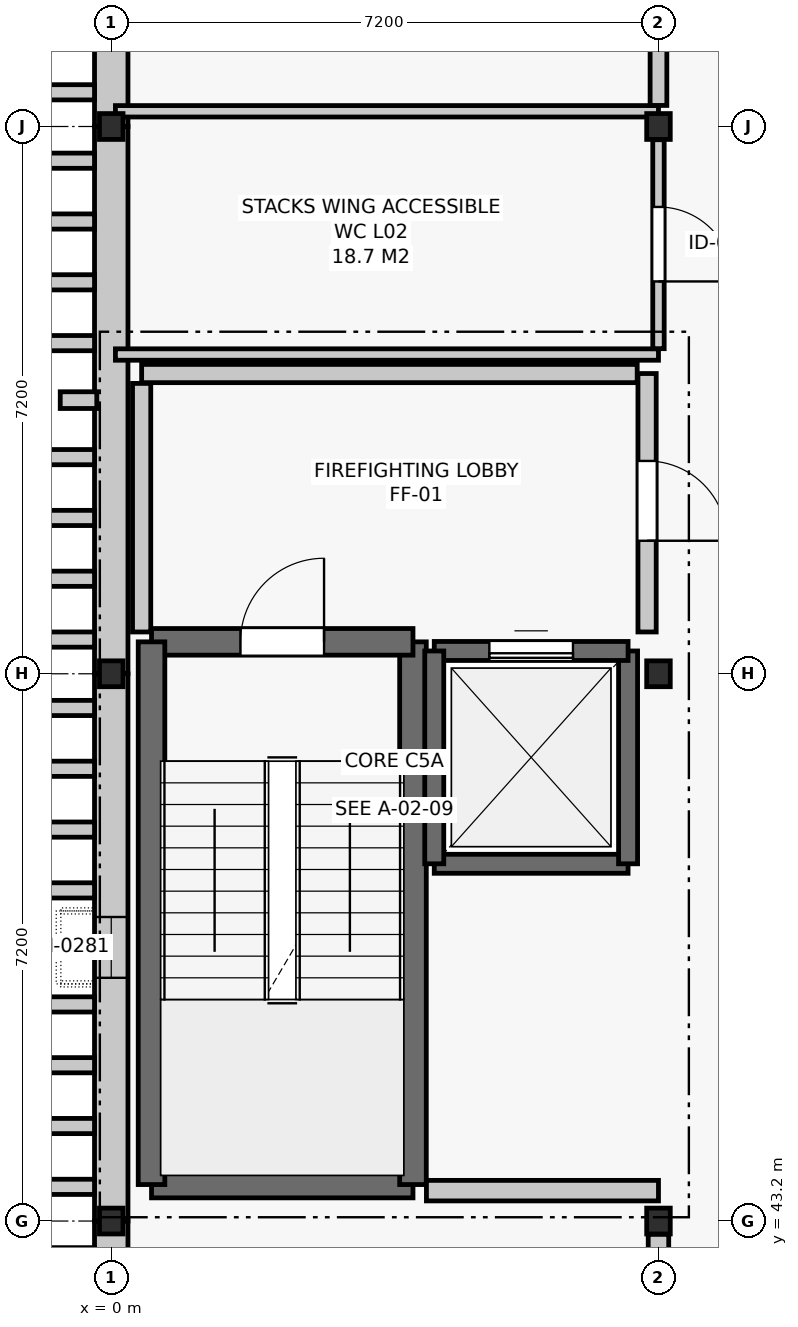
"""IFC4 building model, lengths in metres.
Left out: names, types, materials, properties, quantities, classifications, styles, units other than length and angle.
Written with IfcOpenShell. Run it as: python <this file> out.ifc"""

import sys

from ifc_helpers import new_model, si_unit, direction, frame, frame_2d, origin, origin_2d, place, context, subcontext, project, spatial, rectangle, i_section, extrude, element, fill, save


model = new_model("IFC4")
c1 = context("Model", 3, precision=1e-05, world=origin(), true_north=direction((0.0, 1.0)))
c2 = subcontext(c1, "Body", "Model", "MODEL_VIEW")
j1 = project(units=[si_unit("LENGTHUNIT", "METRE"), si_unit("PLANEANGLEUNIT", "RADIAN")], contexts=[c1])
p1 = place(None, origin())
s1 = spatial("IfcSite", under=j1, at=p1, CompositionType="ELEMENT")
p2 = place(p1, origin())
s2 = spatial("IfcBuilding", under=s1, at=p2, CompositionType="ELEMENT")
p3 = place(p2, frame((0.0, 0.0, 10.2)))
s3 = spatial("IfcBuildingStorey", under=s2, at=p3, CompositionType="ELEMENT", Elevation=10.2)
for number, where, z_axis, x_axis in (
    (1, (0.0, 43.2, 0.0), (0.0, 0.0, 1.0), (1.0, 0.0, 0.0)),
    (2, (0.0, 50.4, 0.0), (0.0, 0.0, 1.0), (1.0, 0.0, 0.0)),
    (3, (0.0, 57.6, 0.0), (0.0, 0.0, 1.0), (1.0, 0.0, 0.0)),
    (4, (7.2, 43.2, 0.0), (0.0, 0.0, 1.0), (1.0, 0.0, 0.0)),
    (5, (7.2, 50.4, 0.0), (0.0, 0.0, 1.0), (1.0, 0.0, 0.0)),
    (6, (7.2, 57.6, 0.0), (0.0, 0.0, 1.0), (1.0, 0.0, 0.0)),
):
    element("IfcColumn", number, at=place(p3, frame(where, z_axis=z_axis, x_axis=x_axis)), inside=s3, PredefinedType="COLUMN", context=c2, shape_type="SweptSolid", body=[
        extrude(i_section(OverallWidth=0.31, OverallDepth=0.34, WebThickness=0.021, FlangeThickness=0.035, FilletRadius=0.027, at=origin_2d()), origin(), (0.0, 0.0, 1.0), 4.2),
    ])
p4 = place(p3, frame((0.0, 64.8, 0.0), z_axis=(0.0, 0.0, 1.0), x_axis=(0.0, -1.0, 0.0)))
e7 = element("IfcWall", 7, at=p4, inside=s3, PredefinedType="SOLIDWALL", context=c2, shape_type="SweptSolid", body=[
    extrude(rectangle(XDim=7.2, YDim=0.44, at=frame_2d((3.6, 0.0))), origin(), (0.0, 0.0, 1.0), 3.02),
])
p5 = place(p4, frame((3.2, 0.0, 0.95)))
e8 = element("IfcOpeningElement", 8, at=p5, cuts=e7, PredefinedType="OPENING", context=c2, shape_type="SweptSolid", body=[
    extrude(rectangle(XDim=0.8, YDim=2.15, at=frame_2d((0.4, 1.075))), frame((0.0, 0.232, 0.0), z_axis=(0.0, -1.0, 0.0), x_axis=(1.0, 0.0, 0.0)), (0.0, 0.0, 1.0), 0.464),
])
p6 = place(p3, frame((0.0, 57.6, 0.0), z_axis=(0.0, 0.0, 1.0), x_axis=(0.0, -1.0, 0.0)))
e9 = element("IfcWall", 9, at=p6, inside=s3, PredefinedType="SOLIDWALL", context=c2, shape_type="SweptSolid", body=[
    extrude(rectangle(XDim=7.2, YDim=0.44, at=frame_2d((3.6, 0.0))), origin(), (0.0, 0.0, 1.0), 3.02),
])
p7 = place(p3, frame((0.0, 50.4, 0.0), z_axis=(0.0, 0.0, 1.0), x_axis=(0.0, -1.0, 0.0)))
e10 = element("IfcWall", 10, at=p7, inside=s3, PredefinedType="SOLIDWALL", context=c2, shape_type="SweptSolid", body=[
    extrude(rectangle(XDim=7.2, YDim=0.44, at=frame_2d((3.6, 0.0))), origin(), (0.0, 0.0, 1.0), 3.02),
])
p8 = place(p7, frame((3.2, 0.0, 0.95)))
e11 = element("IfcOpeningElement", 11, at=p8, cuts=e10, PredefinedType="OPENING", context=c2, shape_type="SweptSolid", body=[
    extrude(rectangle(XDim=0.8, YDim=2.15, at=frame_2d((0.4, 1.075))), frame((0.0, 0.232, 0.0), z_axis=(0.0, -1.0, 0.0), x_axis=(1.0, 0.0, 0.0)), (0.0, 0.0, 1.0), 0.464),
])
p9 = place(p3, frame((0.0, 43.2, 0.0), z_axis=(0.0, 0.0, 1.0), x_axis=(0.0, -1.0, 0.0)))
e12 = element("IfcWall", 12, at=p9, inside=s3, PredefinedType="SOLIDWALL", context=c2, shape_type="SweptSolid", body=[
    extrude(rectangle(XDim=7.2, YDim=0.44, at=frame_2d((3.6, 0.0))), origin(), (0.0, 0.0, 1.0), 3.02),
])
p10 = place(p9, frame((3.2, 0.0, 0.95)))
e13 = element("IfcOpeningElement", 13, at=p10, cuts=e12, PredefinedType="OPENING", context=c2, shape_type="SweptSolid", body=[
    extrude(rectangle(XDim=0.8, YDim=2.15, at=frame_2d((0.4, 1.075))), frame((0.0, 0.232, 0.0), z_axis=(0.0, -1.0, 0.0), x_axis=(1.0, 0.0, 0.0)), (0.0, 0.0, 1.0), 0.464),
])
for number, where, z_axis, x_axis in (
    (14, (-1.66, 43.65, 0.0), (0.0, 0.0, 1.0), (1.0, 0.0, 0.0)),
    (15, (-1.66, 44.45, 0.0), (0.0, 0.0, 1.0), (1.0, 0.0, 0.0)),
    (16, (-1.66, 45.25, 0.0), (0.0, 0.0, 1.0), (1.0, 0.0, 0.0)),
    (17, (-1.66, 46.05, 0.0), (0.0, 0.0, 1.0), (1.0, 0.0, 0.0)),
    (18, (-1.66, 47.55, 0.0), (0.0, 0.0, 1.0), (1.0, 0.0, 0.0)),
    (19, (-1.66, 48.35, 0.0), (0.0, 0.0, 1.0), (1.0, 0.0, 0.0)),
    (20, (-1.66, 49.15, 0.0), (0.0, 0.0, 1.0), (1.0, 0.0, 0.0)),
    (21, (-1.66, 49.95, 0.0), (0.0, 0.0, 1.0), (1.0, 0.0, 0.0)),
    (22, (-1.66, 50.85, 0.0), (0.0, 0.0, 1.0), (1.0, 0.0, 0.0)),
    (23, (-1.66, 51.65, 0.0), (0.0, 0.0, 1.0), (1.0, 0.0, 0.0)),
    (24, (-1.66, 52.45, 0.0), (0.0, 0.0, 1.0), (1.0, 0.0, 0.0)),
    (25, (-1.66, 53.25, 0.0), (0.0, 0.0, 1.0), (1.0, 0.0, 0.0)),
    (26, (-1.66, 54.75, 0.0), (0.0, 0.0, 1.0), (1.0, 0.0, 0.0)),
    (27, (-1.66, 55.55, 0.0), (0.0, 0.0, 1.0), (1.0, 0.0, 0.0)),
    (28, (-1.66, 56.35, 0.0), (0.0, 0.0, 1.0), (1.0, 0.0, 0.0)),
    (29, (-1.66, 57.15, 0.0), (0.0, 0.0, 1.0), (1.0, 0.0, 0.0)),
    (30, (-1.66, 58.05, 0.0), (0.0, 0.0, 1.0), (1.0, 0.0, 0.0)),
):
    element("IfcWall", number, at=place(p3, frame(where, z_axis=z_axis, x_axis=x_axis)), inside=s3, PredefinedType="SOLIDWALL", context=c2, shape_type="SweptSolid", body=[
        extrude(rectangle(XDim=1.44, YDim=0.2, at=frame_2d((0.72, 0.0))), origin(), (0.0, 0.0, 1.0), 4.2),
    ])
p11 = place(p3, frame((0.53, 43.68, 0.0), z_axis=(0.0, 0.0, 1.0), x_axis=(1.0, 0.0, 0.0)))
e31 = element("IfcWall", 31, at=p11, inside=s3, PredefinedType="SHEAR", context=c2, shape_type="SweptSolid", body=[
    extrude(rectangle(XDim=3.44, YDim=0.35, at=frame_2d((1.72, 0.0))), origin(), (0.0, 0.0, 1.0), 3.9),
])
p12 = place(p3, frame((3.97, 43.68, 0.0), z_axis=(0.0, 0.0, 1.0), x_axis=(0.0, 1.0, 0.0)))
e32 = element("IfcWall", 32, at=p12, inside=s3, PredefinedType="SHEAR", context=c2, shape_type="SweptSolid", body=[
    extrude(rectangle(XDim=7.14, YDim=0.35, at=frame_2d((3.57, 0.0))), origin(), (0.0, 0.0, 1.0), 3.9),
])
p13 = place(p3, frame((3.97, 50.82, 0.0), z_axis=(0.0, 0.0, 1.0), x_axis=(-1.0, 0.0, 0.0)))
e33 = element("IfcWall", 33, at=p13, inside=s3, PredefinedType="SHEAR", context=c2, shape_type="SweptSolid", body=[
    extrude(rectangle(XDim=3.44, YDim=0.35, at=frame_2d((1.72, 0.0))), origin(), (0.0, 0.0, 1.0), 3.9),
])
p14 = place(p13, frame((1.17, 0.0, 0.0)))
e34 = element("IfcOpeningElement", 34, at=p14, cuts=e33, PredefinedType="OPENING", context=c2, shape_type="SweptSolid", body=[
    extrude(rectangle(XDim=1.1, YDim=2.15, at=frame_2d((0.55, 1.075))), frame((0.0, 0.187, 0.0), z_axis=(0.0, -1.0, 0.0), x_axis=(1.0, 0.0, 0.0)), (0.0, 0.0, 1.0), 0.374),
])
p15 = place(p3, frame((0.53, 50.82, 0.0), z_axis=(0.0, 0.0, 1.0), x_axis=(0.0, -1.0, 0.0)))
e35 = element("IfcWall", 35, at=p15, inside=s3, PredefinedType="SHEAR", context=c2, shape_type="SweptSolid", body=[
    extrude(rectangle(XDim=7.14, YDim=0.35, at=frame_2d((3.57, 0.0))), origin(), (0.0, 0.0, 1.0), 3.9),
])
p16 = place(p3, frame((7.05, 50.95, 0.0), z_axis=(0.0, 0.0, 1.0), x_axis=(0.0, 1.0, 0.0)))
e36 = element("IfcWall", 36, at=p16, inside=s3, PredefinedType="SOLIDWALL", context=c2, shape_type="SweptSolid", body=[
    extrude(rectangle(XDim=3.4, YDim=0.24, at=frame_2d((1.7, 0.0))), origin(), (0.0, 0.0, 1.0), 3.16),
])
p17 = place(p16, frame((1.2, 0.0, 0.0)))
e37 = element("IfcOpeningElement", 37, at=p17, cuts=e36, PredefinedType="OPENING", context=c2, shape_type="SweptSolid", body=[
    extrude(rectangle(XDim=1.05, YDim=2.15, at=frame_2d((0.525, 1.075))), frame((0.0, 0.132, 0.0), z_axis=(0.0, -1.0, 0.0), x_axis=(1.0, 0.0, 0.0)), (0.0, 0.0, 1.0), 0.264),
])
p18 = place(p3, frame((0.4, 54.35, 0.0), z_axis=(0.0, 0.0, 1.0), x_axis=(1.0, 0.0, 0.0)))
e38 = element("IfcWall", 38, at=p18, inside=s3, PredefinedType="SOLIDWALL", context=c2, shape_type="SweptSolid", body=[
    extrude(rectangle(XDim=6.52, YDim=0.24, at=frame_2d((3.26, 0.0))), origin(), (0.0, 0.0, 1.0), 3.16),
])
p19 = place(p3, frame((0.4, 50.95, 0.0), z_axis=(0.0, 0.0, 1.0), x_axis=(0.0, 1.0, 0.0)))
e39 = element("IfcWall", 39, at=p19, inside=s3, PredefinedType="SOLIDWALL", context=c2, shape_type="SweptSolid", body=[
    extrude(rectangle(XDim=3.27, YDim=0.24, at=frame_2d((1.635, 0.0))), origin(), (0.0, 0.0, 1.0), 3.16),
])
p20 = place(p3, frame((4.25, 47.9, 0.0), z_axis=(0.0, 0.0, 1.0), x_axis=(1.0, 0.0, 0.0)))
e40 = element("IfcWall", 40, at=p20, inside=s3, PredefinedType="SHEAR", context=c2, shape_type="SweptSolid", body=[
    extrude(rectangle(XDim=2.55, YDim=0.25, at=frame_2d((1.275, 0.0))), origin(), (0.0, 0.0, 1.0), 3.9),
])
p21 = place(p3, frame((6.8, 47.9, 0.0), z_axis=(0.0, 0.0, 1.0), x_axis=(0.0, 1.0, 0.0)))
e41 = element("IfcWall", 41, at=p21, inside=s3, PredefinedType="SHEAR", context=c2, shape_type="SweptSolid", body=[
    extrude(rectangle(XDim=2.8, YDim=0.25, at=frame_2d((1.4, 0.0))), origin(), (0.0, 0.0, 1.0), 3.9),
])
p22 = place(p3, frame((6.8, 50.7, 0.0), z_axis=(0.0, 0.0, 1.0), x_axis=(-1.0, 0.0, 0.0)))
e42 = element("IfcWall", 42, at=p22, inside=s3, PredefinedType="SHEAR", context=c2, shape_type="SweptSolid", body=[
    extrude(rectangle(XDim=2.55, YDim=0.25, at=frame_2d((1.275, 0.0))), origin(), (0.0, 0.0, 1.0), 3.9),
])
p23 = place(p22, frame((0.725, 0.0, 0.0)))
e43 = element("IfcOpeningElement", 43, at=p23, cuts=e42, PredefinedType="OPENING", context=c2, shape_type="SweptSolid", body=[
    extrude(rectangle(XDim=1.1, YDim=2.1, at=frame_2d((0.55, 1.05))), frame((0.0, 0.137, 0.0), z_axis=(0.0, -1.0, 0.0), x_axis=(1.0, 0.0, 0.0)), (0.0, 0.0, 1.0), 0.274),
])
p24 = place(p3, frame((4.25, 50.7, 0.0), z_axis=(0.0, 0.0, 1.0), x_axis=(0.0, -1.0, 0.0)))
e44 = element("IfcWall", 44, at=p24, inside=s3, PredefinedType="SHEAR", context=c2, shape_type="SweptSolid", body=[
    extrude(rectangle(XDim=2.8, YDim=0.25, at=frame_2d((1.4, 0.0))), origin(), (0.0, 0.0, 1.0), 3.9),
])
for number, where, z_axis, x_axis in (
    (45, (0.055, 54.6, 0.0), (0.0, 0.0, 1.0), (1.0, 0.0, 0.0)),
    (46, (0.055, 57.8, 0.0), (0.0, 0.0, 1.0), (1.0, 0.0, 0.0)),
):
    element("IfcWall", number, at=place(p3, frame(where, z_axis=z_axis, x_axis=x_axis)), inside=s3, PredefinedType="PARTITIONING", context=c2, shape_type="SweptSolid", body=[
        extrude(rectangle(XDim=7.145, YDim=0.15, at=frame_2d((3.573, 0.0))), origin(), (0.0, 0.0, 1.0), 3.132),
    ])
p25 = place(p3, frame((4.147, 43.6, 0.0), z_axis=(0.0, 0.0, 1.0), x_axis=(1.0, 0.0, 0.0)))
e47 = element("IfcWall", 47, at=p25, inside=s3, PredefinedType="SOLIDWALL", context=c2, shape_type="SweptSolid", body=[
    extrude(rectangle(XDim=3.053, YDim=0.27, at=frame_2d((1.526, 0.0))), origin(), (0.0, 0.0, 1.0), 3.345),
])
p26 = place(p3, frame((7.2, 54.677, 0.0), z_axis=(0.0, 0.0, 1.0), x_axis=(0.0, 1.0, 0.0)))
e48 = element("IfcWall", 48, at=p26, inside=s3, PredefinedType="PARTITIONING", context=c2, shape_type="SweptSolid", body=[
    extrude(rectangle(XDim=2.749, YDim=0.15, at=frame_2d((1.375, 0.0))), origin(), (0.0, 0.0, 1.0), 3.345),
])
p27 = place(p26, frame((0.885, 0.0, 0.0)))
e49 = element("IfcOpeningElement", 49, at=p27, cuts=e48, PredefinedType="OPENING", context=c2, shape_type="SweptSolid", body=[
    extrude(rectangle(XDim=0.98, YDim=2.1, at=frame_2d((0.49, 1.05))), frame((0.0, 0.087, 0.0), z_axis=(0.0, -1.0, 0.0), x_axis=(1.0, 0.0, 0.0)), (0.0, 0.0, 1.0), 0.174),
])
p28 = place(p3, frame((7.2, 36.174, 0.0), z_axis=(0.0, 0.0, 1.0), x_axis=(0.0, 1.0, 0.0)))
e50 = element("IfcWall", 50, at=p28, inside=s3, PredefinedType="SOLIDWALL", context=c2, shape_type="SweptSolid", body=[
    extrude(rectangle(XDim=6.852, YDim=0.27, at=frame_2d((3.426, 0.0))), origin(), (0.0, 0.0, 1.0), 3.345),
])
p29 = place(p28, frame((2.826, 0.0, 0.0)))
e51 = element("IfcOpeningElement", 51, at=p29, cuts=e50, PredefinedType="OPENING", context=c2, shape_type="SweptSolid", body=[
    extrude(rectangle(XDim=1.2, YDim=2.2, at=frame_2d((0.6, 1.1))), frame((0.0, 0.147, 0.0), z_axis=(0.0, -1.0, 0.0), x_axis=(1.0, 0.0, 0.0)), (0.0, 0.0, 1.0), 0.294),
])
p30 = place(p3, frame((7.2, 57.877, 0.0), z_axis=(0.0, 0.0, 1.0), x_axis=(0.0, 1.0, 0.0)))
e52 = element("IfcWall", 52, at=p30, inside=s3, PredefinedType="SOLIDWALL", context=c2, shape_type="SweptSolid", body=[
    extrude(rectangle(XDim=6.749, YDim=0.22, at=frame_2d((3.375, 0.0))), origin(), (0.0, 0.0, 1.0), 3.345),
])
p31 = place(p8, origin())
e53 = element("IfcWindow", 53, at=p31, inside=s3, PartitioningType="SINGLE_PANEL", PredefinedType="WINDOW", context=c2, shape_type="SweptSolid", body=[
    extrude(rectangle(XDim=0.8, YDim=2.15, at=frame_2d((0.4, 1.075))), frame((0.0, 0.03, 0.0), z_axis=(0.0, -1.0, 0.0), x_axis=(1.0, 0.0, 0.0)), (0.0, 0.0, 1.0), 0.06),
])
fill(e11, e53)
p32 = place(p14, frame((1.1, 0.0, 0.0), z_axis=(0.0, 0.0, 1.0), x_axis=(-1.0, 0.0, 0.0)))
e54 = element("IfcDoor", 54, at=p32, inside=s3, OperationType="SINGLE_SWING_RIGHT", PredefinedType="DOOR", context=c2, shape_type="SweptSolid", body=[
    extrude(rectangle(XDim=1.1, YDim=2.15, at=frame_2d((0.55, 1.075))), frame((0.0, 0.025, 0.0), z_axis=(0.0, -1.0, 0.0), x_axis=(1.0, 0.0, 0.0)), (0.0, 0.0, 1.0), 0.05),
])
fill(e34, e54)
p33 = place(p17, frame((1.05, 0.0, 0.0), z_axis=(0.0, 0.0, 1.0), x_axis=(-1.0, 0.0, 0.0)))
e55 = element("IfcDoor", 55, at=p33, inside=s3, OperationType="SINGLE_SWING_RIGHT", PredefinedType="DOOR", context=c2, shape_type="SweptSolid", body=[
    extrude(rectangle(XDim=1.05, YDim=2.15, at=frame_2d((0.525, 1.075))), frame((0.0, 0.025, 0.0), z_axis=(0.0, -1.0, 0.0), x_axis=(1.0, 0.0, 0.0)), (0.0, 0.0, 1.0), 0.05),
])
fill(e37, e55)
p34 = place(p23, origin())
e56 = element("IfcDoor", 56, at=p34, inside=s3, OperationType="SLIDING_TO_RIGHT", PredefinedType="DOOR", context=c2, shape_type="SweptSolid", body=[
    extrude(rectangle(XDim=1.1, YDim=2.1, at=frame_2d((0.55, 1.05))), frame((0.0, 0.025, 0.0), z_axis=(0.0, -1.0, 0.0), x_axis=(1.0, 0.0, 0.0)), (0.0, 0.0, 1.0), 0.05),
])
fill(e43, e56)
p35 = place(p27, frame((0.98, 0.0, 0.0), z_axis=(0.0, 0.0, 1.0), x_axis=(-1.0, 0.0, 0.0)))
e57 = element("IfcDoor", 57, at=p35, inside=s3, OperationType="SINGLE_SWING_RIGHT", PredefinedType="DOOR", context=c2, shape_type="SweptSolid", body=[
    extrude(rectangle(XDim=0.98, YDim=2.1, at=frame_2d((0.49, 1.05))), frame((0.0, 0.025, 0.0), z_axis=(0.0, -1.0, 0.0), x_axis=(1.0, 0.0, 0.0)), (0.0, 0.0, 1.0), 0.05),
])
fill(e49, e57)
save(model, sys.argv[1])
